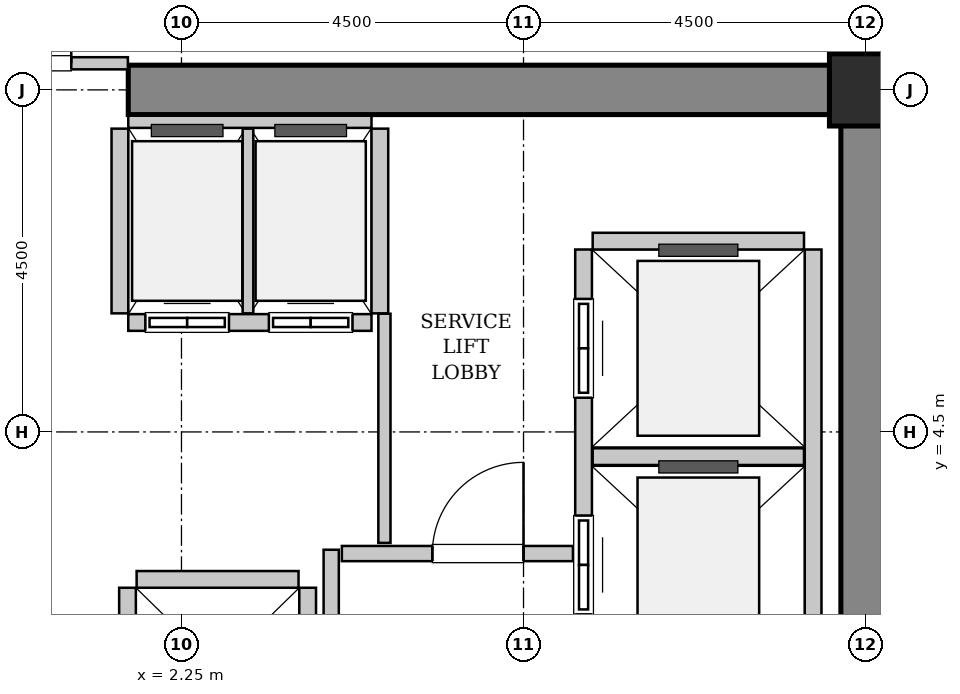
"""IFC4 building model, lengths in metres.
Left out: names, types, materials, properties, quantities, classifications, styles, units other than length and angle.
Written with IfcOpenShell. Run it as: python <this file> out.ifc"""

import sys

from ifc_helpers import new_model, si_unit, direction, frame, frame_2d, origin, origin_2d, place, context, subcontext, project, spatial, rectangle, hollow_rectangle, extrude, source, transform, mapped, element, fill, save


model = new_model("IFC4")
c1 = context("Model", 3, precision=1e-05, world=origin(), true_north=direction((0.0, 1.0)))
c2 = subcontext(c1, "Body", "Model", "MODEL_VIEW")
j1 = project(units=[si_unit("LENGTHUNIT", "METRE"), si_unit("PLANEANGLEUNIT", "RADIAN")], contexts=[c1])
p1 = place(None, origin())
s1 = spatial("IfcSite", under=j1, at=p1, CompositionType="ELEMENT")
p2 = place(p1, origin())
s2 = spatial("IfcBuilding", under=s1, at=p2, CompositionType="ELEMENT")
p3 = place(p2, frame((0.0, 0.0, 52.0)))
s3 = spatial("IfcBuildingStorey", under=s2, at=p3, CompositionType="ELEMENT", Elevation=52.0)
m1 = source(origin(), c2, "Body", "SweptSolid", [
    extrude(rectangle(XDim=10.025, YDim=0.65, at=frame_2d((5.012, 0.0))), origin(), (0.0, 0.0, 1.0), 3.8),
])
p4 = place(p3, frame((1.55, 9.0, 0.0), z_axis=(0.0, 0.0, 1.0), x_axis=(1.0, 0.0, 0.0)))
e1 = element("IfcWall", 1, at=p4, inside=s3, PredefinedType="SHEAR", context=c2, shape_type="MappedRepresentation", body=[
    mapped(m1, transform((0.0, 0.0, 0.0), x_axis=(1.0, 0.0, 0.0), y_axis=(0.0, 1.0, 0.0), z_axis=(0.0, 0.0, 1.0), scale=1.0)),
])
m2 = source(origin(), c2, "Body", "SweptSolid", [
    extrude(rectangle(XDim=7.325, YDim=0.65, at=frame_2d((3.663, 0.0))), origin(), (0.0, 0.0, 1.0), 3.8),
])
p5 = place(p3, frame((11.25, 1.35, 0.0), z_axis=(0.0, 0.0, 1.0), x_axis=(0.0, 1.0, 0.0)))
e2 = element("IfcWall", 2, at=p5, inside=s3, PredefinedType="SHEAR", context=c2, shape_type="MappedRepresentation", body=[
    mapped(m2, transform((0.0, 0.0, 0.0), x_axis=(1.0, 0.0, 0.0), y_axis=(0.0, 1.0, 0.0), z_axis=(0.0, 0.0, 1.0), scale=1.0)),
])
m3 = source(origin(), c2, "Body", "SweptSolid", [
    extrude(hollow_rectangle(XDim=0.95, YDim=0.95, WallThickness=0.045, InnerFilletRadius=0.045, OuterFilletRadius=0.09, at=origin_2d()), origin(), (0.0, 0.0, 1.0), 3.8),
])
p6 = place(p3, frame((11.25, 9.0, 0.0), z_axis=(0.0, 0.0, 1.0), x_axis=(1.0, 0.0, 0.0)))
e3 = element("IfcColumn", 3, at=p6, inside=s3, PredefinedType="COLUMN", context=c2, shape_type="MappedRepresentation", body=[
    mapped(m3, transform((0.0, 0.0, 0.0), x_axis=(1.0, 0.0, 0.0), y_axis=(0.0, 1.0, 0.0), z_axis=(0.0, 0.0, 1.0), scale=1.0)),
])
m4 = source(origin(), c2, "Body", "SweptSolid", [
    extrude(rectangle(XDim=5.45, YDim=0.22, at=frame_2d((2.725, 0.0))), origin(), (0.0, 0.0, 1.0), 3.535),
])
p7 = place(p3, frame((7.54, 6.9, 0.0), z_axis=(0.0, 0.0, 1.0), x_axis=(0.0, -1.0, 0.0)))
e4 = element("IfcWall", 4, at=p7, inside=s3, PredefinedType="SOLIDWALL", context=c2, shape_type="MappedRepresentation", body=[
    mapped(m4, transform((0.0, 0.0, 0.0), x_axis=(1.0, 0.0, 0.0), y_axis=(0.0, 1.0, 0.0), z_axis=(0.0, 0.0, 1.0), scale=1.0)),
])
p8 = place(p7, frame((3.5, 0.0, 0.0)))
e5 = element("IfcOpeningElement", 5, at=p8, cuts=e4, PredefinedType="OPENING", context=c2, shape_type="SweptSolid", body=[
    extrude(rectangle(XDim=1.3, YDim=2.3, at=frame_2d((0.65, 1.15))), frame((0.0, 0.12, 0.0), z_axis=(0.0, -1.0, 0.0), x_axis=(1.0, 0.0, 0.0)), (0.0, 0.0, 1.0), 0.24),
])
p9 = place(p7, frame((0.65, 0.0, 0.0)))
e6 = element("IfcOpeningElement", 6, at=p9, cuts=e4, PredefinedType="OPENING", context=c2, shape_type="SweptSolid", body=[
    extrude(rectangle(XDim=1.3, YDim=2.3, at=frame_2d((0.65, 1.15))), frame((0.0, 0.12, 0.0), z_axis=(0.0, -1.0, 0.0), x_axis=(1.0, 0.0, 0.0)), (0.0, 0.0, 1.0), 0.24),
])
p10 = place(p3, frame((10.56, 1.45, 0.0), z_axis=(0.0, 0.0, 1.0), x_axis=(0.0, 1.0, 0.0)))
e7 = element("IfcWall", 7, at=p10, inside=s3, PredefinedType="SOLIDWALL", context=c2, shape_type="MappedRepresentation", body=[
    mapped(m4, transform((0.0, 0.0, 0.0), x_axis=(1.0, 0.0, 0.0), y_axis=(0.0, 1.0, 0.0), z_axis=(0.0, 0.0, 1.0), scale=1.0)),
])
m5 = source(origin(), c2, "Body", "SweptSolid", [
    extrude(rectangle(XDim=2.78, YDim=0.22, at=frame_2d((1.39, 0.0))), origin(), (0.0, 0.0, 1.0), 3.535),
])
for number, where, z_axis, x_axis in (
    (8, (7.66, 4.175, 0.0), (0.0, 0.0, 1.0), (1.0, 0.0, 0.0)),
    (9, (10.44, 7.01, 0.0), (0.0, 0.0, 1.0), (-1.0, 0.0, 0.0)),
):
    element("IfcWall", number, at=place(p3, frame(where, z_axis=z_axis, x_axis=x_axis)), inside=s3, PredefinedType="SOLIDWALL", context=c2, shape_type="MappedRepresentation", body=[
        mapped(m5, transform((0.0, 0.0, 0.0), x_axis=(1.0, 0.0, 0.0), y_axis=(0.0, 1.0, 0.0), z_axis=(0.0, 0.0, 1.0), scale=1.0)),
    ])
m6 = source(origin(), c2, "Body", "SweptSolid", [
    extrude(rectangle(XDim=3.2, YDim=0.22, at=frame_2d((1.6, 0.0))), origin(), (0.0, 0.0, 1.0), 3.535),
])
p11 = place(p3, frame((1.55, 5.94, 0.0), z_axis=(0.0, 0.0, 1.0), x_axis=(1.0, 0.0, 0.0)))
e10 = element("IfcWall", 10, at=p11, inside=s3, PredefinedType="SOLIDWALL", context=c2, shape_type="MappedRepresentation", body=[
    mapped(m6, transform((0.0, 0.0, 0.0), x_axis=(1.0, 0.0, 0.0), y_axis=(0.0, 1.0, 0.0), z_axis=(0.0, 0.0, 1.0), scale=1.0)),
])
p12 = place(p11, frame((0.225, 0.0, 0.0)))
e11 = element("IfcOpeningElement", 11, at=p12, cuts=e10, PredefinedType="OPENING", context=c2, shape_type="SweptSolid", body=[
    extrude(rectangle(XDim=1.1, YDim=2.2, at=frame_2d((0.55, 1.1))), frame((0.0, 0.12, 0.0), z_axis=(0.0, -1.0, 0.0), x_axis=(1.0, 0.0, 0.0)), (0.0, 0.0, 1.0), 0.24),
])
p13 = place(p11, frame((1.85, 0.0, 0.0)))
e12 = element("IfcOpeningElement", 12, at=p13, cuts=e10, PredefinedType="OPENING", context=c2, shape_type="SweptSolid", body=[
    extrude(rectangle(XDim=1.1, YDim=2.2, at=frame_2d((0.55, 1.1))), frame((0.0, 0.12, 0.0), z_axis=(0.0, -1.0, 0.0), x_axis=(1.0, 0.0, 0.0)), (0.0, 0.0, 1.0), 0.24),
])
m7 = source(origin(), c2, "Body", "SweptSolid", [
    extrude(rectangle(XDim=3.2, YDim=0.16, at=frame_2d((1.6, 0.0))), origin(), (0.0, 0.0, 1.0), 2.425),
])
p14 = place(p3, frame((4.75, 8.58, 0.0), z_axis=(0.0, 0.0, 1.0), x_axis=(-1.0, 0.0, 0.0)))
e13 = element("IfcWall", 13, at=p14, inside=s3, PredefinedType="PARTITIONING", context=c2, shape_type="MappedRepresentation", body=[
    mapped(m7, transform((0.0, 0.0, 0.0), x_axis=(1.0, 0.0, 0.0), y_axis=(0.0, 1.0, 0.0), z_axis=(0.0, 0.0, 1.0), scale=1.0)),
])
m8 = source(origin(), c2, "Body", "SweptSolid", [
    extrude(rectangle(XDim=2.43, YDim=0.22, at=frame_2d((1.215, 0.0))), origin(), (0.0, 0.0, 1.0), 3.535),
])
p15 = place(p3, frame((1.44, 8.49, 0.0), z_axis=(0.0, 0.0, 1.0), x_axis=(0.0, -1.0, 0.0)))
e14 = element("IfcWall", 14, at=p15, inside=s3, PredefinedType="SOLIDWALL", context=c2, shape_type="MappedRepresentation", body=[
    mapped(m8, transform((0.0, 0.0, 0.0), x_axis=(1.0, 0.0, 0.0), y_axis=(0.0, 1.0, 0.0), z_axis=(0.0, 0.0, 1.0), scale=1.0)),
])
m9 = source(origin(), c2, "Body", "SweptSolid", [
    extrude(rectangle(XDim=2.43, YDim=0.14, at=frame_2d((1.215, 0.0))), origin(), (0.0, 0.0, 1.0), 3.535),
])
p16 = place(p3, frame((3.125, 6.06, 0.0), z_axis=(0.0, 0.0, 1.0), x_axis=(0.0, 1.0, 0.0)))
e15 = element("IfcWall", 15, at=p16, inside=s3, PredefinedType="PARTITIONING", context=c2, shape_type="MappedRepresentation", body=[
    mapped(m9, transform((0.0, 0.0, 0.0), x_axis=(1.0, 0.0, 0.0), y_axis=(0.0, 1.0, 0.0), z_axis=(0.0, 0.0, 1.0), scale=1.0)),
])
p17 = place(p3, frame((4.86, 6.06, 0.0), z_axis=(0.0, 0.0, 1.0), x_axis=(0.0, 1.0, 0.0)))
e16 = element("IfcWall", 16, at=p17, inside=s3, PredefinedType="SOLIDWALL", context=c2, shape_type="MappedRepresentation", body=[
    mapped(m8, transform((0.0, 0.0, 0.0), x_axis=(1.0, 0.0, 0.0), y_axis=(0.0, 1.0, 0.0), z_axis=(0.0, 0.0, 1.0), scale=1.0)),
])
m10 = source(origin(), c2, "Body", "SweptSolid", [
    extrude(rectangle(XDim=4.9, YDim=0.22, at=frame_2d((2.45, 0.0))), origin(), (0.0, 0.0, 1.0), 3.535),
])
for number, where, z_axis, x_axis in (
    (17, (1.54, 2.45, 0.0), (0.0, 0.0, 1.0), (0.0, -1.0, 0.0)),
    (18, (3.91, -2.45, 0.0), (0.0, 0.0, 1.0), (0.0, 1.0, 0.0)),
):
    element("IfcWall", number, at=place(p3, frame(where, z_axis=z_axis, x_axis=x_axis)), inside=s3, PredefinedType="SOLIDWALL", context=c2, shape_type="MappedRepresentation", body=[
        mapped(m10, transform((0.0, 0.0, 0.0), x_axis=(1.0, 0.0, 0.0), y_axis=(0.0, 1.0, 0.0), z_axis=(0.0, 0.0, 1.0), scale=1.0)),
    ])
m11 = source(origin(), c2, "Body", "SweptSolid", [
    extrude(rectangle(XDim=2.13, YDim=0.22, at=frame_2d((1.065, 0.0))), origin(), (0.0, 0.0, 1.0), 3.535),
])
p18 = place(p3, frame((3.79, 2.56, 0.0), z_axis=(0.0, 0.0, 1.0), x_axis=(-1.0, 0.0, 0.0)))
e19 = element("IfcWall", 19, at=p18, inside=s3, PredefinedType="SOLIDWALL", context=c2, shape_type="MappedRepresentation", body=[
    mapped(m11, transform((0.0, 0.0, 0.0), x_axis=(1.0, 0.0, 0.0), y_axis=(0.0, 1.0, 0.0), z_axis=(0.0, 0.0, 1.0), scale=1.0)),
])
m12 = source(origin(), c2, "Body", "SweptSolid", [
    extrude(rectangle(XDim=5.9, YDim=0.2, at=frame_2d((2.95, 0.0))), origin(), (0.0, 0.0, 1.0), 3.535),
])
p19 = place(p3, frame((4.22, -2.95, 0.0), z_axis=(0.0, 0.0, 1.0), x_axis=(0.0, 1.0, 0.0)))
e20 = element("IfcWall", 20, at=p19, inside=s3, PredefinedType="PARTITIONING", context=c2, shape_type="MappedRepresentation", body=[
    mapped(m12, transform((0.0, 0.0, 0.0), x_axis=(1.0, 0.0, 0.0), y_axis=(0.0, 1.0, 0.0), z_axis=(0.0, 0.0, 1.0), scale=1.0)),
])
m13 = source(origin(), c2, "Body", "SweptSolid", [
    extrude(rectangle(XDim=3.04, YDim=0.2, at=frame_2d((1.52, 0.0))), origin(), (0.0, 0.0, 1.0), 3.535),
])
p20 = place(p3, frame((4.36, 2.9, 0.0), z_axis=(0.0, 0.0, 1.0), x_axis=(1.0, 0.0, 0.0)))
e21 = element("IfcWall", 21, at=p20, inside=s3, PredefinedType="PARTITIONING", context=c2, shape_type="MappedRepresentation", body=[
    mapped(m13, transform((0.0, 0.0, 0.0), x_axis=(1.0, 0.0, 0.0), y_axis=(0.0, 1.0, 0.0), z_axis=(0.0, 0.0, 1.0), scale=1.0)),
])
p21 = place(p20, frame((1.19, 0.0, 0.0)))
e22 = element("IfcOpeningElement", 22, at=p21, cuts=e21, PredefinedType="OPENING", context=c2, shape_type="SweptSolid", body=[
    extrude(rectangle(XDim=1.2, YDim=2.15, at=frame_2d((0.6, 1.075))), frame((0.0, 0.11, 0.0), z_axis=(0.0, -1.0, 0.0), x_axis=(1.0, 0.0, 0.0)), (0.0, 0.0, 1.0), 0.22),
])
m14 = source(origin(), c2, "Body", "SweptSolid", [
    extrude(rectangle(XDim=3.09, YDim=0.16, at=frame_2d((1.545, 0.0))), origin(), (0.0, 0.0, 1.0), 2.425),
])
p22 = place(p3, frame((-1.545, 9.35, 0.0), z_axis=(0.0, 0.0, 1.0), x_axis=(1.0, 0.0, 0.0)))
e23 = element("IfcWall", 23, at=p22, inside=s3, PredefinedType="PARTITIONING", context=c2, shape_type="MappedRepresentation", body=[
    mapped(m14, transform((0.0, 0.0, 0.0), x_axis=(1.0, 0.0, 0.0), y_axis=(0.0, 1.0, 0.0), z_axis=(0.0, 0.0, 1.0), scale=1.0)),
])
p23 = place(p22, frame((0.745, 0.0, 0.0)))
e24 = element("IfcOpeningElement", 24, at=p23, cuts=e23, PredefinedType="OPENING", context=c2, shape_type="SweptSolid", body=[
    extrude(rectangle(XDim=1.6, YDim=2.3, at=frame_2d((0.8, 1.15))), frame((0.0, 0.09, 0.0), z_axis=(0.0, -1.0, 0.0), x_axis=(1.0, 0.0, 0.0)), (0.0, 0.0, 1.0), 0.18),
])
m15 = source(origin(), c2, "Body", "SweptSolid", [
    extrude(rectangle(XDim=3.015, YDim=0.16, at=frame_2d((1.507, 0.0))), origin(), (0.0, 0.0, 1.0), 3.535),
])
p24 = place(p3, frame((4.92, 3.04, 0.0), z_axis=(0.0, 0.0, 1.0), x_axis=(0.0, 1.0, 0.0)))
e25 = element("IfcWall", 25, at=p24, inside=s3, PredefinedType="PARTITIONING", context=c2, shape_type="MappedRepresentation", body=[
    mapped(m15, transform((0.0, 0.0, 0.0), x_axis=(1.0, 0.0, 0.0), y_axis=(0.0, 1.0, 0.0), z_axis=(0.0, 0.0, 1.0), scale=1.0)),
])
m16 = source(origin(), c2, "Body", "SweptSolid", [
    extrude(rectangle(XDim=1.3, YDim=2.3, at=frame_2d((0.65, 1.15))), frame((0.0, 0.025, 0.0), z_axis=(0.0, -1.0, 0.0), x_axis=(1.0, 0.0, 0.0)), (0.0, 0.0, 1.0), 0.05),
])
p25 = place(p8, origin())
e26 = element("IfcDoor", 26, at=p25, inside=s3, OperationType="SLIDING_TO_RIGHT", PredefinedType="DOOR", context=c2, shape_type="MappedRepresentation", body=[
    mapped(m16, transform((0.0, 0.0, 0.0), x_axis=(1.0, 0.0, 0.0), y_axis=(0.0, 1.0, 0.0), z_axis=(0.0, 0.0, 1.0), scale=1.0)),
])
fill(e5, e26)
p26 = place(p9, origin())
e27 = element("IfcDoor", 27, at=p26, inside=s3, OperationType="SLIDING_TO_RIGHT", PredefinedType="DOOR", context=c2, shape_type="MappedRepresentation", body=[
    mapped(m16, transform((0.0, 0.0, 0.0), x_axis=(1.0, 0.0, 0.0), y_axis=(0.0, 1.0, 0.0), z_axis=(0.0, 0.0, 1.0), scale=1.0)),
])
fill(e6, e27)
m17 = source(origin(), c2, "Body", "SweptSolid", [
    extrude(rectangle(XDim=1.1, YDim=2.2, at=frame_2d((0.55, 1.1))), frame((0.0, 0.025, 0.0), z_axis=(0.0, -1.0, 0.0), x_axis=(1.0, 0.0, 0.0)), (0.0, 0.0, 1.0), 0.05),
])
p27 = place(p12, origin())
e28 = element("IfcDoor", 28, at=p27, inside=s3, OperationType="DOUBLE_DOOR_SLIDING", PredefinedType="DOOR", context=c2, shape_type="MappedRepresentation", body=[
    mapped(m17, transform((0.0, 0.0, 0.0), x_axis=(1.0, 0.0, 0.0), y_axis=(0.0, 1.0, 0.0), z_axis=(0.0, 0.0, 1.0), scale=1.0)),
])
fill(e11, e28)
p28 = place(p13, origin())
e29 = element("IfcDoor", 29, at=p28, inside=s3, OperationType="DOUBLE_DOOR_SLIDING", PredefinedType="DOOR", context=c2, shape_type="MappedRepresentation", body=[
    mapped(m17, transform((0.0, 0.0, 0.0), x_axis=(1.0, 0.0, 0.0), y_axis=(0.0, 1.0, 0.0), z_axis=(0.0, 0.0, 1.0), scale=1.0)),
])
fill(e12, e29)
m18 = source(origin(), c2, "Body", "SweptSolid", [
    extrude(rectangle(XDim=1.2, YDim=2.15, at=frame_2d((0.6, 1.075))), frame((0.0, 0.025, 0.0), z_axis=(0.0, -1.0, 0.0), x_axis=(1.0, 0.0, 0.0)), (0.0, 0.0, 1.0), 0.05),
])
p29 = place(p21, origin())
e30 = element("IfcDoor", 30, at=p29, inside=s3, OperationType="SINGLE_SWING_RIGHT", PredefinedType="DOOR", context=c2, shape_type="MappedRepresentation", body=[
    mapped(m18, transform((0.0, 0.0, 0.0), x_axis=(1.0, 0.0, 0.0), y_axis=(0.0, 1.0, 0.0), z_axis=(0.0, 0.0, 1.0), scale=1.0)),
])
fill(e22, e30)
m19 = source(origin(), c2, "Body", "SweptSolid", [
    extrude(rectangle(XDim=1.6, YDim=2.3, at=frame_2d((0.8, 1.15))), frame((0.0, 0.025, 0.0), z_axis=(0.0, -1.0, 0.0), x_axis=(1.0, 0.0, 0.0)), (0.0, 0.0, 1.0), 0.05),
])
p30 = place(p23, origin())
e31 = element("IfcDoor", 31, at=p30, inside=s3, OperationType="DOUBLE_DOOR_SINGLE_SWING", PredefinedType="DOOR", context=c2, shape_type="MappedRepresentation", body=[
    mapped(m19, transform((0.0, 0.0, 0.0), x_axis=(1.0, 0.0, 0.0), y_axis=(0.0, 1.0, 0.0), z_axis=(0.0, 0.0, 1.0), scale=1.0)),
])
fill(e24, e31)
save(model, sys.argv[1])
